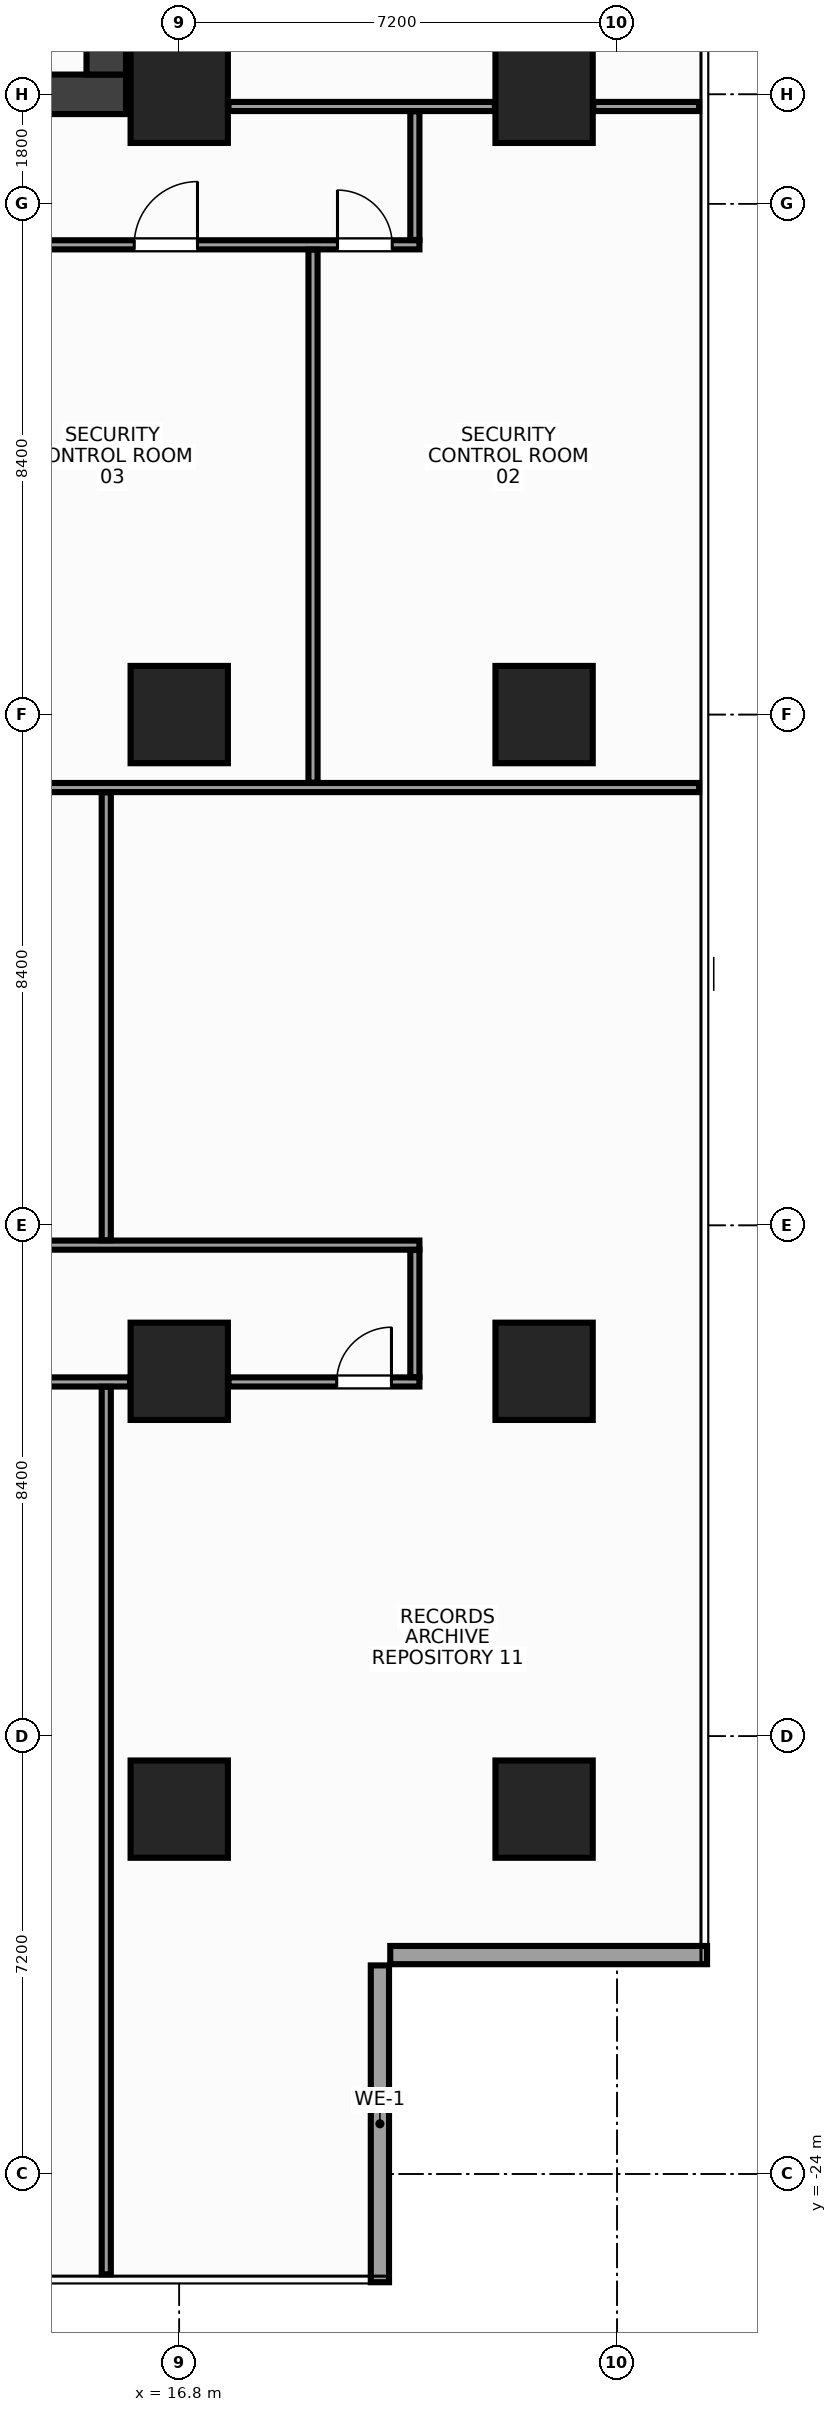
"""IFC4 building model, lengths in metres.
Left out: names, types, materials, properties, quantities, classifications, styles, units other than length and angle.
Written with IfcOpenShell. Run it as: python <this file> out.ifc"""

import sys

from ifc_helpers import new_model, si_unit, direction, frame, frame_2d, origin, origin_2d, place, context, subcontext, project, spatial, rectangle, extrude, source, transform, mapped, element, fill, save


model = new_model("IFC4")
c1 = context("Model", 3, precision=1e-05, world=origin(), true_north=direction((0.0, 1.0)))
c2 = subcontext(c1, "Body", "Model", "MODEL_VIEW")
j1 = project(units=[si_unit("LENGTHUNIT", "METRE"), si_unit("PLANEANGLEUNIT", "RADIAN")], contexts=[c1])
p1 = place(None, origin())
s1 = spatial("IfcSite", under=j1, at=p1, CompositionType="ELEMENT")
p2 = place(p1, origin())
s2 = spatial("IfcBuilding", under=s1, at=p2, CompositionType="ELEMENT")
p3 = place(p2, frame((0.0, 0.0, 95.6)))
s3 = spatial("IfcBuildingStorey", under=s2, at=p3, CompositionType="ELEMENT", Elevation=95.6)
m1 = source(origin(), c2, "Body", "SweptSolid", [
    extrude(rectangle(XDim=31.85, YDim=0.65, at=frame_2d((15.925, 0.0))), origin(), (0.0, 0.0, 1.0), 3.6),
])
p4 = place(p3, frame((-15.925, 10.2, 0.0), z_axis=(0.0, 0.0, 1.0), x_axis=(1.0, 0.0, 0.0)))
e1 = element("IfcWall", 1, at=p4, inside=s3, PredefinedType="SHEAR", context=c2, shape_type="MappedRepresentation", body=[
    mapped(m1, transform((0.0, 0.0, 0.0), x_axis=(1.0, 0.0, 0.0), y_axis=(0.0, 1.0, 0.0), z_axis=(0.0, 0.0, 1.0), scale=1.0)),
])
p5 = place(p4, frame((1.775, 0.0, 0.0)))
e2 = element("IfcOpeningElement", 2, at=p5, cuts=e1, PredefinedType="OPENING", context=c2, shape_type="SweptSolid", body=[
    extrude(rectangle(XDim=1.6, YDim=2.15, at=frame_2d((0.8, 1.075))), frame((0.0, 0.337, 0.0), z_axis=(0.0, -1.0, 0.0), x_axis=(1.0, 0.0, 0.0)), (0.0, 0.0, 1.0), 0.674),
])
p6 = place(p4, frame((28.475, 0.0, 0.0)))
e3 = element("IfcOpeningElement", 3, at=p6, cuts=e1, PredefinedType="OPENING", context=c2, shape_type="SweptSolid", body=[
    extrude(rectangle(XDim=1.6, YDim=2.15, at=frame_2d((0.8, 1.075))), frame((0.0, 0.337, 0.0), z_axis=(0.0, -1.0, 0.0), x_axis=(1.0, 0.0, 0.0)), (0.0, 0.0, 1.0), 0.674),
])
p7 = place(p4, frame((15.175, 0.0, 0.0)))
e4 = element("IfcOpeningElement", 4, at=p7, cuts=e1, PredefinedType="OPENING", context=c2, shape_type="SweptSolid", body=[
    extrude(rectangle(XDim=1.5, YDim=2.2, at=frame_2d((0.75, 1.1))), frame((0.0, 0.337, 0.0), z_axis=(0.0, -1.0, 0.0), x_axis=(1.0, 0.0, 0.0)), (0.0, 0.0, 1.0), 0.674),
])
m2 = source(origin(), c2, "Body", "SweptSolid", [
    extrude(rectangle(XDim=12.95, YDim=0.65, at=frame_2d((6.475, 0.0))), origin(), (0.0, 0.0, 1.0), 3.6),
])
p8 = place(p3, frame((15.6, 10.525, 0.0), z_axis=(0.0, 0.0, 1.0), x_axis=(0.0, 1.0, 0.0)))
e5 = element("IfcWall", 5, at=p8, inside=s3, PredefinedType="SHEAR", context=c2, shape_type="MappedRepresentation", body=[
    mapped(m2, transform((0.0, 0.0, 0.0), x_axis=(1.0, 0.0, 0.0), y_axis=(0.0, 1.0, 0.0), z_axis=(0.0, 0.0, 1.0), scale=1.0)),
])
m3 = source(origin(), c2, "Body", "SweptSolid", [
    extrude(rectangle(XDim=1.6, YDim=1.6, at=origin_2d()), origin(), (0.0, 0.0, 1.0), 3.6),
])
for number, where, z_axis, x_axis in (
    (6, (16.8, -18.0, 0.0), (0.0, 0.0, 1.0), (1.0, 0.0, 0.0)),
    (7, (16.8, -10.8, 0.0), (0.0, 0.0, 1.0), (1.0, 0.0, 0.0)),
    (8, (16.8, 0.0, 0.0), (0.0, 0.0, 1.0), (1.0, 0.0, 0.0)),
    (9, (16.8, 10.2, 0.0), (0.0, 0.0, 1.0), (1.0, 0.0, 0.0)),
    (10, (22.8, -18.0, 0.0), (0.0, 0.0, 1.0), (1.0, 0.0, 0.0)),
    (11, (22.8, -10.8, 0.0), (0.0, 0.0, 1.0), (1.0, 0.0, 0.0)),
    (12, (22.8, 0.0, 0.0), (0.0, 0.0, 1.0), (1.0, 0.0, 0.0)),
    (13, (22.8, 10.2, 0.0), (0.0, 0.0, 1.0), (1.0, 0.0, 0.0)),
):
    element("IfcColumn", number, at=place(p3, frame(where, z_axis=z_axis, x_axis=x_axis)), inside=s3, PredefinedType="COLUMN", context=c2, shape_type="MappedRepresentation", body=[
        mapped(m3, transform((0.0, 0.0, 0.0), x_axis=(1.0, 0.0, 0.0), y_axis=(0.0, 1.0, 0.0), z_axis=(0.0, 0.0, 1.0), scale=1.0)),
    ])
m4 = source(origin(), c2, "Body", "SweptSolid", [
    extrude(rectangle(XDim=5.21, YDim=0.3, at=frame_2d((2.605, 0.0))), origin(), (0.0, 0.0, 1.0), 2.74),
])
for number, where, z_axis, x_axis in (
    (14, (20.1, -25.78, 0.0), (0.0, 0.0, 1.0), (0.0, 1.0, 0.0)),
    (15, (20.27, -20.4, 0.0), (0.0, 0.0, 1.0), (1.0, 0.0, 0.0)),
):
    element("IfcWall", number, at=place(p3, frame(where, z_axis=z_axis, x_axis=x_axis)), inside=s3, PredefinedType="STANDARD", context=c2, shape_type="MappedRepresentation", body=[
        mapped(m4, transform((0.0, 0.0, 0.0), x_axis=(1.0, 0.0, 0.0), y_axis=(0.0, 1.0, 0.0), z_axis=(0.0, 0.0, 1.0), scale=1.0)),
    ])
m5 = source(origin(), c2, "Body", "SweptSolid", [
    extrude(rectangle(XDim=4.38, YDim=0.15, at=frame_2d((2.19, 0.0))), origin(), (0.0, 0.0, 1.0), 2.745),
])
p9 = place(p3, frame((17.61, 10.0, 0.0), z_axis=(0.0, 0.0, 1.0), x_axis=(1.0, 0.0, 0.0)))
e16 = element("IfcWall", 16, at=p9, inside=s3, PredefinedType="PARTITIONING", context=c2, shape_type="MappedRepresentation", body=[
    mapped(m5, transform((0.0, 0.0, 0.0), x_axis=(1.0, 0.0, 0.0), y_axis=(0.0, 1.0, 0.0), z_axis=(0.0, 0.0, 1.0), scale=1.0)),
])
m6 = source(origin(), c2, "Body", "SweptSolid", [
    extrude(rectangle(XDim=1.74, YDim=0.15, at=frame_2d((0.87, 0.0))), origin(), (0.0, 0.0, 1.0), 3.36),
])
p10 = place(p3, frame((23.61, 10.0, 0.0), z_axis=(0.0, 0.0, 1.0), x_axis=(1.0, 0.0, 0.0)))
e17 = element("IfcWall", 17, at=p10, inside=s3, PredefinedType="PARTITIONING", context=c2, shape_type="MappedRepresentation", body=[
    mapped(m6, transform((0.0, 0.0, 0.0), x_axis=(1.0, 0.0, 0.0), y_axis=(0.0, 1.0, 0.0), z_axis=(0.0, 0.0, 1.0), scale=1.0)),
])
m7 = source(origin(), c2, "Body", "SweptSolid", [
    extrude(rectangle(XDim=22.3, YDim=0.15, at=frame_2d((11.15, 0.0))), origin(), (0.0, 0.0, 1.0), 2.745),
])
p11 = place(p3, frame((-1.55, 7.725, 0.0), z_axis=(0.0, 0.0, 1.0), x_axis=(1.0, 0.0, 0.0)))
e18 = element("IfcWall", 18, at=p11, inside=s3, PredefinedType="PARTITIONING", context=c2, shape_type="MappedRepresentation", body=[
    mapped(m7, transform((0.0, 0.0, 0.0), x_axis=(1.0, 0.0, 0.0), y_axis=(0.0, 1.0, 0.0), z_axis=(0.0, 0.0, 1.0), scale=1.0)),
])
p12 = place(p11, frame((20.952, 0.0, 0.0)))
e19 = element("IfcOpeningElement", 19, at=p12, cuts=e18, PredefinedType="OPENING", context=c2, shape_type="SweptSolid", body=[
    extrude(rectangle(XDim=0.9, YDim=2.15, at=frame_2d((0.45, 1.075))), frame((0.0, 0.087, 0.0), z_axis=(0.0, -1.0, 0.0), x_axis=(1.0, 0.0, 0.0)), (0.0, 0.0, 1.0), 0.174),
])
p13 = place(p11, frame((17.61, 0.0, 0.0)))
e20 = element("IfcOpeningElement", 20, at=p13, cuts=e18, PredefinedType="OPENING", context=c2, shape_type="SweptSolid", body=[
    extrude(rectangle(XDim=1.04, YDim=2.2, at=frame_2d((0.52, 1.1))), frame((0.0, 0.087, 0.0), z_axis=(0.0, -1.0, 0.0), x_axis=(1.0, 0.0, 0.0)), (0.0, 0.0, 1.0), 0.174),
])
p14 = place(p11, frame((2.677, 0.0, 0.0)))
e21 = element("IfcOpeningElement", 21, at=p14, cuts=e18, PredefinedType="OPENING", context=c2, shape_type="SweptSolid", body=[
    extrude(rectangle(XDim=1.04, YDim=2.2, at=frame_2d((0.52, 1.1))), frame((0.0, 0.087, 0.0), z_axis=(0.0, -1.0, 0.0), x_axis=(1.0, 0.0, 0.0)), (0.0, 0.0, 1.0), 0.174),
])
p15 = place(p11, frame((9.63, 0.0, 0.0)))
e22 = element("IfcOpeningElement", 22, at=p15, cuts=e18, PredefinedType="OPENING", context=c2, shape_type="SweptSolid", body=[
    extrude(rectangle(XDim=1.04, YDim=2.2, at=frame_2d((0.52, 1.1))), frame((0.0, 0.087, 0.0), z_axis=(0.0, -1.0, 0.0), x_axis=(1.0, 0.0, 0.0)), (0.0, 0.0, 1.0), 0.174),
])
p16 = place(p3, frame((-1.55, -8.725, 0.0), z_axis=(0.0, 0.0, 1.0), x_axis=(1.0, 0.0, 0.0)))
e23 = element("IfcWall", 23, at=p16, inside=s3, PredefinedType="PARTITIONING", context=c2, shape_type="MappedRepresentation", body=[
    mapped(m7, transform((0.0, 0.0, 0.0), x_axis=(1.0, 0.0, 0.0), y_axis=(0.0, 1.0, 0.0), z_axis=(0.0, 0.0, 1.0), scale=1.0)),
])
p17 = place(p16, frame((1.897, 0.0, 0.0)))
e24 = element("IfcOpeningElement", 24, at=p17, cuts=e23, PredefinedType="OPENING", context=c2, shape_type="SweptSolid", body=[
    extrude(rectangle(XDim=1.04, YDim=2.2, at=frame_2d((0.52, 1.1))), frame((0.0, 0.087, 0.0), z_axis=(0.0, -1.0, 0.0), x_axis=(1.0, 0.0, 0.0)), (0.0, 0.0, 1.0), 0.174),
])
p18 = place(p16, frame((10.23, 0.0, 0.0)))
e25 = element("IfcOpeningElement", 25, at=p18, cuts=e23, PredefinedType="OPENING", context=c2, shape_type="SweptSolid", body=[
    extrude(rectangle(XDim=1.04, YDim=2.2, at=frame_2d((0.52, 1.1))), frame((0.0, 0.087, 0.0), z_axis=(0.0, -1.0, 0.0), x_axis=(1.0, 0.0, 0.0)), (0.0, 0.0, 1.0), 0.174),
])
m8 = source(origin(), c2, "Body", "SweptSolid", [
    extrude(rectangle(XDim=7.08, YDim=0.15, at=frame_2d((3.54, 0.0))), origin(), (0.0, 0.0, 1.0), 2.745),
])
p19 = place(p3, frame((8.91, -10.975, 0.0), z_axis=(0.0, 0.0, 1.0), x_axis=(1.0, 0.0, 0.0)))
e26 = element("IfcWall", 26, at=p19, inside=s3, PredefinedType="PARTITIONING", context=c2, shape_type="MappedRepresentation", body=[
    mapped(m8, transform((0.0, 0.0, 0.0), x_axis=(1.0, 0.0, 0.0), y_axis=(0.0, 1.0, 0.0), z_axis=(0.0, 0.0, 1.0), scale=1.0)),
])
m9 = source(origin(), c2, "Body", "SweptSolid", [
    extrude(rectangle(XDim=3.14, YDim=0.15, at=frame_2d((1.57, 0.0))), origin(), (0.0, 0.0, 1.0), 2.745),
])
p20 = place(p3, frame((17.61, -10.975, 0.0), z_axis=(0.0, 0.0, 1.0), x_axis=(1.0, 0.0, 0.0)))
e27 = element("IfcWall", 27, at=p20, inside=s3, PredefinedType="PARTITIONING", context=c2, shape_type="MappedRepresentation", body=[
    mapped(m9, transform((0.0, 0.0, 0.0), x_axis=(1.0, 0.0, 0.0), y_axis=(0.0, 1.0, 0.0), z_axis=(0.0, 0.0, 1.0), scale=1.0)),
])
p21 = place(p20, frame((1.78, 0.0, 0.0)))
e28 = element("IfcOpeningElement", 28, at=p21, cuts=e27, PredefinedType="OPENING", context=c2, shape_type="SweptSolid", body=[
    extrude(rectangle(XDim=0.9, YDim=2.15, at=frame_2d((0.45, 1.075))), frame((0.0, 0.087, 0.0), z_axis=(0.0, -1.0, 0.0), x_axis=(1.0, 0.0, 0.0)), (0.0, 0.0, 1.0), 0.174),
])
m10 = source(origin(), c2, "Body", "SweptSolid", [
    extrude(rectangle(XDim=2.115, YDim=0.15, at=frame_2d((1.058, 0.0))), origin(), (0.0, 0.0, 1.0), 3.36),
])
p22 = place(p3, frame((20.675, 7.805, 0.0), z_axis=(0.0, 0.0, 1.0), x_axis=(0.0, 1.0, 0.0)))
e29 = element("IfcWall", 29, at=p22, inside=s3, PredefinedType="PARTITIONING", context=c2, shape_type="MappedRepresentation", body=[
    mapped(m10, transform((0.0, 0.0, 0.0), x_axis=(1.0, 0.0, 0.0), y_axis=(0.0, 1.0, 0.0), z_axis=(0.0, 0.0, 1.0), scale=1.0)),
])
m11 = source(origin(), c2, "Body", "SweptSolid", [
    extrude(rectangle(XDim=2.09, YDim=0.15, at=frame_2d((1.045, 0.0))), origin(), (0.0, 0.0, 1.0), 3.36),
])
p23 = place(p3, frame((20.675, -10.895, 0.0), z_axis=(0.0, 0.0, 1.0), x_axis=(0.0, 1.0, 0.0)))
e30 = element("IfcWall", 30, at=p23, inside=s3, PredefinedType="PARTITIONING", context=c2, shape_type="MappedRepresentation", body=[
    mapped(m11, transform((0.0, 0.0, 0.0), x_axis=(1.0, 0.0, 0.0), y_axis=(0.0, 1.0, 0.0), z_axis=(0.0, 0.0, 1.0), scale=1.0)),
])
m12 = source(origin(), c2, "Body", "SweptSolid", [
    extrude(rectangle(XDim=26.895, YDim=0.15, at=frame_2d((13.448, 0.0))), origin(), (0.0, 0.0, 1.0), 2.745),
])
p24 = place(p3, frame((-1.545, -1.2, 0.0), z_axis=(0.0, 0.0, 1.0), x_axis=(1.0, 0.0, 0.0)))
e31 = element("IfcWall", 31, at=p24, inside=s3, PredefinedType="PARTITIONING", context=c2, shape_type="MappedRepresentation", body=[
    mapped(m12, transform((0.0, 0.0, 0.0), x_axis=(1.0, 0.0, 0.0), y_axis=(0.0, 1.0, 0.0), z_axis=(0.0, 0.0, 1.0), scale=1.0)),
])
m13 = source(origin(), c2, "Body", "SweptSolid", [
    extrude(rectangle(XDim=8.765, YDim=0.15, at=frame_2d((4.383, 0.0))), origin(), (0.0, 0.0, 1.0), 2.745),
])
p25 = place(p3, frame((19.0, -1.12, 0.0), z_axis=(0.0, 0.0, 1.0), x_axis=(0.0, 1.0, 0.0)))
e32 = element("IfcWall", 32, at=p25, inside=s3, PredefinedType="PARTITIONING", context=c2, shape_type="MappedRepresentation", body=[
    mapped(m13, transform((0.0, 0.0, 0.0), x_axis=(1.0, 0.0, 0.0), y_axis=(0.0, 1.0, 0.0), z_axis=(0.0, 0.0, 1.0), scale=1.0)),
])
m14 = source(origin(), c2, "Body", "SweptSolid", [
    extrude(rectangle(XDim=14.595, YDim=0.15, at=frame_2d((7.297, 0.0))), origin(), (0.0, 0.0, 1.0), 2.745),
])
p26 = place(p3, frame((15.6, -25.65, 0.0), z_axis=(0.0, 0.0, 1.0), x_axis=(0.0, 1.0, 0.0)))
e33 = element("IfcWall", 33, at=p26, inside=s3, PredefinedType="PARTITIONING", context=c2, shape_type="MappedRepresentation", body=[
    mapped(m14, transform((0.0, 0.0, 0.0), x_axis=(1.0, 0.0, 0.0), y_axis=(0.0, 1.0, 0.0), z_axis=(0.0, 0.0, 1.0), scale=1.0)),
])
m15 = source(origin(), c2, "Body", "SweptSolid", [
    extrude(rectangle(XDim=7.365, YDim=0.15, at=frame_2d((3.683, 0.0))), origin(), (0.0, 0.0, 1.0), 3.36),
])
p27 = place(p3, frame((15.6, -8.645, 0.0), z_axis=(0.0, 0.0, 1.0), x_axis=(0.0, 1.0, 0.0)))
e34 = element("IfcWall", 34, at=p27, inside=s3, PredefinedType="PARTITIONING", context=c2, shape_type="MappedRepresentation", body=[
    mapped(m15, transform((0.0, 0.0, 0.0), x_axis=(1.0, 0.0, 0.0), y_axis=(0.0, 1.0, 0.0), z_axis=(0.0, 0.0, 1.0), scale=1.0)),
])
m16 = source(origin(), c2, "Body", "SweptSolid", [
    extrude(rectangle(XDim=0.9, YDim=2.15, at=frame_2d((0.45, 1.075))), frame((0.0, 0.025, 0.0), z_axis=(0.0, -1.0, 0.0), x_axis=(1.0, 0.0, 0.0)), (0.0, 0.0, 1.0), 0.05),
])
p28 = place(p12, origin())
e35 = element("IfcDoor", 35, at=p28, inside=s3, OperationType="SINGLE_SWING_LEFT", PredefinedType="DOOR", context=c2, shape_type="MappedRepresentation", body=[
    mapped(m16, transform((0.0, 0.0, 0.0), x_axis=(1.0, 0.0, 0.0), y_axis=(0.0, 1.0, 0.0), z_axis=(0.0, 0.0, 1.0), scale=1.0)),
])
fill(e19, e35)
m17 = source(origin(), c2, "Body", "SweptSolid", [
    extrude(rectangle(XDim=1.04, YDim=2.2, at=frame_2d((0.52, 1.1))), frame((0.0, 0.025, 0.0), z_axis=(0.0, -1.0, 0.0), x_axis=(1.0, 0.0, 0.0)), (0.0, 0.0, 1.0), 0.05),
])
p29 = place(p13, origin())
e36 = element("IfcDoor", 36, at=p29, inside=s3, OperationType="SINGLE_SWING_RIGHT", PredefinedType="DOOR", context=c2, shape_type="MappedRepresentation", body=[
    mapped(m17, transform((0.0, 0.0, 0.0), x_axis=(1.0, 0.0, 0.0), y_axis=(0.0, 1.0, 0.0), z_axis=(0.0, 0.0, 1.0), scale=1.0)),
])
fill(e20, e36)
p30 = place(p21, origin())
e37 = element("IfcDoor", 37, at=p30, inside=s3, OperationType="SINGLE_SWING_RIGHT", PredefinedType="DOOR", context=c2, shape_type="MappedRepresentation", body=[
    mapped(m16, transform((0.0, 0.0, 0.0), x_axis=(1.0, 0.0, 0.0), y_axis=(0.0, 1.0, 0.0), z_axis=(0.0, 0.0, 1.0), scale=1.0)),
])
fill(e28, e37)
save(model, sys.argv[1])
